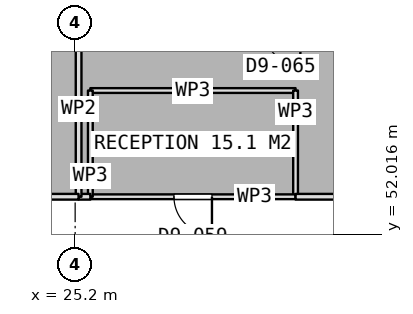
"""IFC4 building model, lengths in metres.
Left out: names, types, materials, properties, quantities, classifications, styles, units other than length and angle.
Written with IfcOpenShell. Run it as: python <this file> out.ifc"""

import sys

from ifc_helpers import new_model, si_unit, direction, frame, frame_2d, origin, place, context, subcontext, project, spatial, rectangle, extrude, element, fill, save


model = new_model("IFC4")
c1 = context("Model", 3, precision=1e-05, world=origin(), true_north=direction((0.0, 1.0)))
c2 = subcontext(c1, "Body", "Model", "MODEL_VIEW")
j1 = project(units=[si_unit("LENGTHUNIT", "METRE"), si_unit("PLANEANGLEUNIT", "RADIAN")], contexts=[c1])
p1 = place(None, origin())
s1 = spatial("IfcSite", under=j1, at=p1, CompositionType="ELEMENT")
p2 = place(p1, origin())
s2 = spatial("IfcBuilding", under=s1, at=p2, CompositionType="ELEMENT")
p3 = place(p2, frame((0.0, 0.0, 32.9)))
s3 = spatial("IfcBuildingStorey", under=s2, at=p3, CompositionType="ELEMENT", Elevation=32.9)
p4 = place(p3, frame((25.6, 55.795, 0.0), z_axis=(0.0, 0.0, 1.0), x_axis=(1.0, 0.0, 0.0)))
e1 = element("IfcWall", 1, at=p4, inside=s3, PredefinedType="PARTITIONING", context=c2, shape_type="SweptSolid", body=[
    extrude(rectangle(XDim=5.4, YDim=0.125, at=frame_2d((2.7, 0.0))), origin(), (0.0, 0.0, 1.0), 3.5),
])
p5 = place(p3, frame((31.0, 55.795, 0.0), z_axis=(0.0, 0.0, 1.0), x_axis=(0.0, -1.0, 0.0)))
e2 = element("IfcWall", 2, at=p5, inside=s3, PredefinedType="PARTITIONING", context=c2, shape_type="SweptSolid", body=[
    extrude(rectangle(XDim=2.795, YDim=0.125, at=frame_2d((1.397, 0.0))), origin(), (0.0, 0.0, 1.0), 3.5),
])
p6 = place(p3, frame((31.0, 53.0, 0.0), z_axis=(0.0, 0.0, 1.0), x_axis=(-1.0, 0.0, 0.0)))
e3 = element("IfcWall", 3, at=p6, inside=s3, PredefinedType="PARTITIONING", context=c2, shape_type="SweptSolid", body=[
    extrude(rectangle(XDim=5.4, YDim=0.125, at=frame_2d((2.7, 0.0))), origin(), (0.0, 0.0, 1.0), 3.5),
])
p7 = place(p6, frame((2.2, 0.0, 0.0)))
e4 = element("IfcOpeningElement", 4, at=p7, cuts=e3, PredefinedType="OPENING", context=c2, shape_type="SweptSolid", body=[
    extrude(rectangle(XDim=1.0, YDim=2.1, at=frame_2d((0.5, 1.05))), frame((0.0, 0.073, 0.0), z_axis=(0.0, -1.0, 0.0), x_axis=(1.0, 0.0, 0.0)), (0.0, 0.0, 1.0), 0.145),
])
p8 = place(p3, frame((25.6, 53.0, 0.0), z_axis=(0.0, 0.0, 1.0), x_axis=(0.0, 1.0, 0.0)))
e5 = element("IfcWall", 5, at=p8, inside=s3, PredefinedType="PARTITIONING", context=c2, shape_type="SweptSolid", body=[
    extrude(rectangle(XDim=2.795, YDim=0.125, at=frame_2d((1.397, 0.0))), origin(), (0.0, 0.0, 1.0), 3.5),
])
p9 = place(p3, frame((36.3, 53.0, 0.0), z_axis=(0.0, 0.0, 1.0), x_axis=(-1.0, 0.0, 0.0)))
e6 = element("IfcWall", 6, at=p9, inside=s3, PredefinedType="PARTITIONING", context=c2, shape_type="SweptSolid", body=[
    extrude(rectangle(XDim=5.3, YDim=0.15, at=frame_2d((2.65, 0.0))), origin(), (0.0, 0.0, 1.0), 3.5),
])
p10 = place(p3, frame((25.6, 53.0, 0.0), z_axis=(0.0, 0.0, 1.0), x_axis=(-1.0, 0.0, 0.0)))
e7 = element("IfcWall", 7, at=p10, inside=s3, PredefinedType="PARTITIONING", context=c2, shape_type="SweptSolid", body=[
    extrude(rectangle(XDim=0.309, YDim=0.15, at=frame_2d((0.155, 0.0))), origin(), (0.0, 0.0, 1.0), 3.5),
])
p11 = place(p3, frame((25.291, 53.0, 0.0), z_axis=(0.0, 0.0, 1.0), x_axis=(0.0, 1.0, 0.0)))
e8 = element("IfcWall", 8, at=p11, inside=s3, PredefinedType="PARTITIONING", context=c2, shape_type="SweptSolid", body=[
    extrude(rectangle(XDim=4.613, YDim=0.15, at=frame_2d((2.307, 0.0))), origin(), (0.0, 0.0, 1.0), 3.5),
])
p12 = place(p3, frame((25.331, 57.68, 0.0), z_axis=(0.0, 0.0, 1.0), x_axis=(-0.995411812081, -0.095683459231, 0.0)))
e9 = element("IfcWall", 9, at=p12, inside=s3, PredefinedType="PARTITIONING", context=c2, shape_type="SweptSolid", body=[
    extrude(rectangle(XDim=9.803, YDim=0.125, at=frame_2d((4.901, 0.0))), origin(), (0.0, 0.0, 1.0), 3.5),
])
p13 = place(p12, frame((4.768, 0.0, 0.0)))
e10 = element("IfcOpeningElement", 10, at=p13, cuts=e9, PredefinedType="OPENING", context=c2, shape_type="SweptSolid", body=[
    extrude(rectangle(XDim=1.0, YDim=2.1, at=frame_2d((0.5, 1.05))), frame((0.0, 0.073, 0.0), z_axis=(0.0, -1.0, 0.0), x_axis=(1.0, 0.0, 0.0)), (0.0, 0.0, 1.0), 0.145),
])
p14 = place(p3, frame((25.29, 53.0, 0.0), z_axis=(0.0, 0.0, 1.0), x_axis=(-1.0, 0.0, 0.0)))
e11 = element("IfcWall", 11, at=p14, inside=s3, PredefinedType="PARTITIONING", context=c2, shape_type="SweptSolid", body=[
    extrude(rectangle(XDim=2.89, YDim=0.15, at=frame_2d((1.445, 0.0))), origin(), (0.0, 0.0, 1.0), 3.5),
])
p15 = place(p7, origin())
e12 = element("IfcDoor", 12, at=p15, inside=s3, OperationType="SINGLE_SWING_LEFT", PredefinedType="DOOR", context=c2, shape_type="SweptSolid", body=[
    extrude(rectangle(XDim=1.0, YDim=2.1, at=frame_2d((0.5, 1.05))), frame((0.0, 0.025, 0.0), z_axis=(0.0, -1.0, 0.0), x_axis=(1.0, 0.0, 0.0)), (0.0, 0.0, 1.0), 0.05),
])
fill(e4, e12)
save(model, sys.argv[1])
